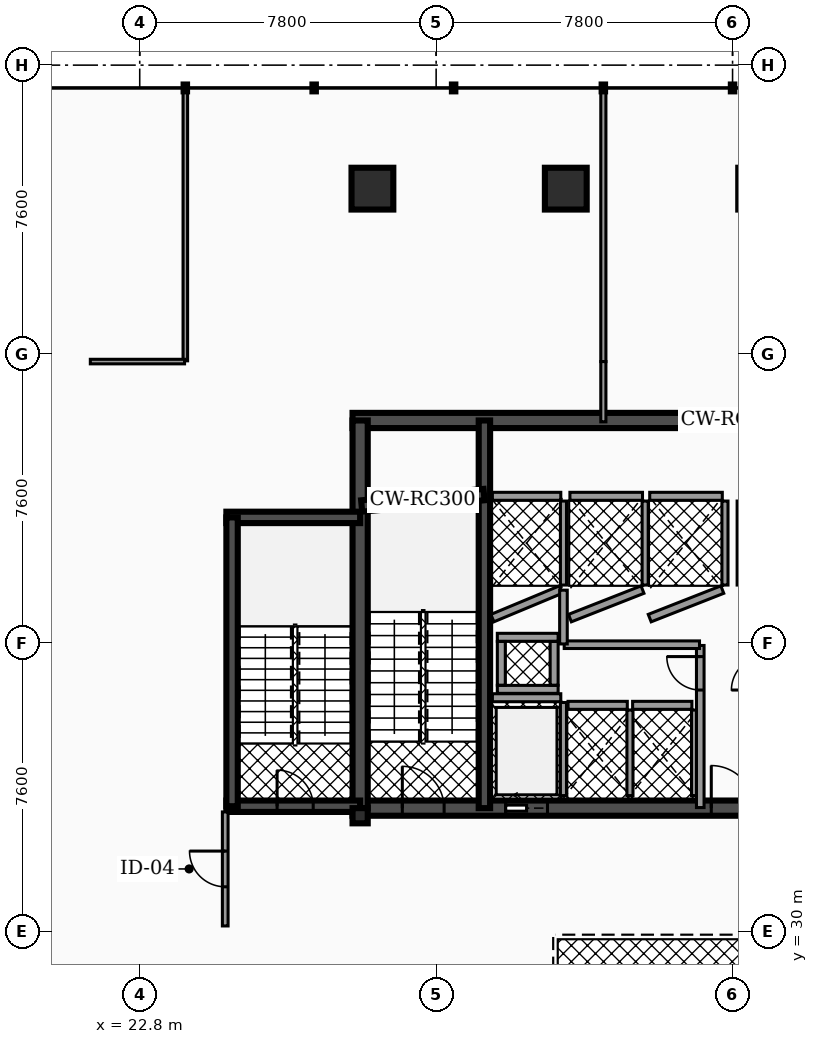
"""IFC4 building model, lengths in metres.
Left out: names, types, materials, properties, quantities, classifications, styles, units other than length and angle.
Written with IfcOpenShell. Run it as: python <this file> out.ifc"""

import sys

from ifc_helpers import new_model, si_unit, direction, frame, frame_2d, origin, origin_2d, place, context, subcontext, project, spatial, rectangle, hollow_rectangle, extrude, element, fill, save


model = new_model("IFC4")
c1 = context("Model", 3, precision=1e-05, world=origin(), true_north=direction((0.0, 1.0)))
c2 = subcontext(c1, "Body", "Model", "MODEL_VIEW")
j1 = project(units=[si_unit("LENGTHUNIT", "METRE"), si_unit("PLANEANGLEUNIT", "RADIAN")], contexts=[c1])
p1 = place(None, origin())
s1 = spatial("IfcSite", under=j1, at=p1, CompositionType="ELEMENT")
p2 = place(p1, origin())
s2 = spatial("IfcBuilding", under=s1, at=p2, CompositionType="ELEMENT")
p3 = place(p2, frame((0.0, 0.0, 5.1)))
s3 = spatial("IfcBuildingStorey", under=s2, at=p3, CompositionType="ELEMENT", Elevation=5.1)
p4 = place(p3, frame((28.4, 43.45, 0.0), z_axis=(0.0, 0.0, 1.0), x_axis=(1.0, 0.0, 0.0)))
e1 = element("IfcWall", 1, at=p4, inside=s3, PredefinedType="SHEAR", context=c2, shape_type="SweptSolid", body=[
    extrude(rectangle(XDim=20.06, YDim=0.4, at=frame_2d((10.03, 0.0))), origin(), (0.0, 0.0, 1.0), 4.14),
])
p5 = place(p3, frame((28.4, 33.25, 0.0), z_axis=(0.0, 0.0, 1.0), x_axis=(1.0, 0.0, 0.0)))
e2 = element("IfcWall", 2, at=p5, inside=s3, PredefinedType="SHEAR", context=c2, shape_type="SweptSolid", body=[
    extrude(rectangle(XDim=20.06, YDim=0.4, at=frame_2d((10.03, 0.0))), origin(), (0.0, 0.0, 1.0), 4.14),
])
p6 = place(p5, frame((4.03, 0.0, 0.0)))
e3 = element("IfcOpeningElement", 3, at=p6, cuts=e2, PredefinedType="OPENING", context=c2, shape_type="SweptSolid", body=[
    extrude(rectangle(XDim=1.1, YDim=2.15, at=frame_2d((0.55, 1.075))), frame((0.0, 0.21, 0.0), z_axis=(0.0, -1.0, 0.0), x_axis=(1.0, 0.0, 0.0)), (0.0, 0.0, 1.0), 0.42),
])
p7 = place(p5, frame((14.87, 0.0, 0.0)))
e4 = element("IfcOpeningElement", 4, at=p7, cuts=e2, PredefinedType="OPENING", context=c2, shape_type="SweptSolid", body=[
    extrude(rectangle(XDim=1.1, YDim=2.15, at=frame_2d((0.55, 1.075))), frame((0.0, 0.21, 0.0), z_axis=(0.0, -1.0, 0.0), x_axis=(1.0, 0.0, 0.0)), (0.0, 0.0, 1.0), 0.42),
])
p8 = place(p5, frame((1.31, 0.0, 0.0)))
e5 = element("IfcOpeningElement", 5, at=p8, cuts=e2, PredefinedType="OPENING", context=c2, shape_type="SweptSolid", body=[
    extrude(rectangle(XDim=1.1, YDim=2.2, at=frame_2d((0.55, 1.1))), frame((0.0, 0.21, 0.0), z_axis=(0.0, -1.0, 0.0), x_axis=(1.0, 0.0, 0.0)), (0.0, 0.0, 1.0), 0.42),
])
p9 = place(p5, frame((9.44, 0.0, 0.0)))
e6 = element("IfcOpeningElement", 6, at=p9, cuts=e2, PredefinedType="OPENING", context=c2, shape_type="SweptSolid", body=[
    extrude(rectangle(XDim=1.12, YDim=2.05, at=frame_2d((0.56, 1.025))), frame((0.0, 0.21, 0.0), z_axis=(0.0, -1.0, 0.0), x_axis=(1.0, 0.0, 0.0)), (0.0, 0.0, 1.0), 0.42),
])
p10 = place(p5, frame((17.65, 0.0, 0.0)))
e7 = element("IfcOpeningElement", 7, at=p10, cuts=e2, PredefinedType="OPENING", context=c2, shape_type="SweptSolid", body=[
    extrude(rectangle(XDim=1.1, YDim=2.2, at=frame_2d((0.55, 1.1))), frame((0.0, 0.21, 0.0), z_axis=(0.0, -1.0, 0.0), x_axis=(1.0, 0.0, 0.0)), (0.0, 0.0, 1.0), 0.42),
])
p11 = place(p3, frame((28.6, 33.25, 0.0), z_axis=(0.0, 0.0, 1.0), x_axis=(0.0, 1.0, 0.0)))
e8 = element("IfcWall", 8, at=p11, inside=s3, PredefinedType="SHEAR", context=c2, shape_type="SweptSolid", body=[
    extrude(rectangle(XDim=10.2, YDim=0.4, at=frame_2d((5.1, 0.0))), origin(), (0.0, 0.0, 1.0), 4.14),
])
p12 = place(p3, frame((31.87, 33.25, 0.0), z_axis=(0.0, 0.0, 1.0), x_axis=(0.0, 1.0, 0.0)))
e9 = element("IfcWall", 9, at=p12, inside=s3, PredefinedType="SHEAR", context=c2, shape_type="SweptSolid", body=[
    extrude(rectangle(XDim=10.2, YDim=0.3, at=frame_2d((5.1, 0.0))), origin(), (0.0, 0.0, 1.0), 4.14),
])
p13 = place(p3, frame((28.64, 41.2, 0.0), z_axis=(0.0, 0.0, 1.0), x_axis=(0.995687118776, 0.092774789157, 0.0)))
e10 = element("IfcWall", 10, at=p13, inside=s3, PredefinedType="SHEAR", context=c2, shape_type="SweptSolid", body=[
    extrude(rectangle(XDim=3.234, YDim=0.3, at=frame_2d((1.617, 0.0))), origin(), (0.0, 0.0, 1.0), 4.14),
])
p14 = place(p3, frame((25.08, 40.9, 0.0), z_axis=(0.0, 0.0, 1.0), x_axis=(1.0, 0.0, 0.0)))
e11 = element("IfcWall", 11, at=p14, inside=s3, PredefinedType="SHEAR", context=c2, shape_type="SweptSolid", body=[
    extrude(rectangle(XDim=3.52, YDim=0.3, at=frame_2d((1.76, 0.0))), origin(), (0.0, 0.0, 1.0), 4.14),
])
p15 = place(p3, frame((25.08, 33.3, 0.0), z_axis=(0.0, 0.0, 1.0), x_axis=(1.0, 0.0, 0.0)))
e12 = element("IfcWall", 12, at=p15, inside=s3, PredefinedType="SHEAR", context=c2, shape_type="SweptSolid", body=[
    extrude(rectangle(XDim=3.52, YDim=0.3, at=frame_2d((1.76, 0.0))), origin(), (0.0, 0.0, 1.0), 4.14),
])
p16 = place(p15, frame((1.335, 0.0, 0.0)))
e13 = element("IfcOpeningElement", 13, at=p16, cuts=e12, PredefinedType="OPENING", context=c2, shape_type="SweptSolid", body=[
    extrude(rectangle(XDim=0.95, YDim=2.2, at=frame_2d((0.475, 1.1))), frame((0.0, 0.16, 0.0), z_axis=(0.0, -1.0, 0.0), x_axis=(1.0, 0.0, 0.0)), (0.0, 0.0, 1.0), 0.32),
])
p17 = place(p3, frame((25.23, 33.3, 0.0), z_axis=(0.0, 0.0, 1.0), x_axis=(0.0, 1.0, 0.0)))
e14 = element("IfcWall", 14, at=p17, inside=s3, PredefinedType="SHEAR", context=c2, shape_type="SweptSolid", body=[
    extrude(rectangle(XDim=7.6, YDim=0.3, at=frame_2d((3.8, 0.0))), origin(), (0.0, 0.0, 1.0), 4.14),
])
for number, where, z_axis, x_axis in (
    (15, (34.011, 49.55, 0.0), (0.0, 0.0, 1.0), (1.0, 0.0, 0.0)),
    (16, (28.923, 49.55, 0.0), (0.0, 0.0, 1.0), (1.0, 0.0, 0.0)),
):
    element("IfcColumn", number, at=place(p3, frame(where, z_axis=z_axis, x_axis=x_axis)), inside=s3, PredefinedType="COLUMN", context=c2, shape_type="SweptSolid", body=[
        extrude(hollow_rectangle(XDim=1.1, YDim=1.1, WallThickness=0.055, at=origin_2d()), origin(), (0.0, 0.0, 1.0), 4.14),
    ])
p18 = place(p3, frame((28.6, 33.05, 0.0), z_axis=(0.0, 0.0, 1.0), x_axis=(1.0, 0.0, 0.0)))
e17 = element("IfcColumn", 17, at=p18, inside=s3, PredefinedType="PILASTER", context=c2, shape_type="SweptSolid", body=[
    extrude(hollow_rectangle(XDim=0.4, YDim=0.4, WallThickness=0.02, at=origin_2d()), origin(), (0.0, 0.0, 1.0), 4.14),
])
p19 = place(p3, frame((32.08, 36.155, 0.0), z_axis=(0.0, 0.0, 1.0), x_axis=(1.0, 0.0, 0.0)))
e18 = element("IfcWall", 18, at=p19, inside=s3, PredefinedType="SOLIDWALL", context=c2, shape_type="SweptSolid", body=[
    extrude(rectangle(XDim=1.8, YDim=0.21, at=frame_2d((0.9, 0.0))), origin(), (0.0, 0.0, 1.0), 3.112),
])
p20 = place(p3, frame((33.95, 33.58, 0.0), z_axis=(0.0, 0.0, 1.0), x_axis=(0.0, 1.0, 0.0)))
e19 = element("IfcWall", 19, at=p20, inside=s3, PredefinedType="SOLIDWALL", context=c2, shape_type="SweptSolid", body=[
    extrude(rectangle(XDim=2.45, YDim=0.16, at=frame_2d((1.225, 0.0))), origin(), (0.0, 0.0, 1.0), 3.112),
])
p21 = place(p3, frame((32.08, 38.25, 0.0), z_axis=(0.0, 0.0, 1.0), x_axis=(0.923062104416, 0.384650947472, 0.0)))
e20 = element("IfcWall", 20, at=p21, inside=s3, PredefinedType="SOLIDWALL", context=c2, shape_type="SweptSolid", body=[
    extrude(rectangle(XDim=1.95, YDim=0.21, at=frame_2d((0.975, 0.0))), origin(), (0.0, 0.0, 1.0), 3.112),
])
p22 = place(p3, frame((32.08, 41.455, 0.0), z_axis=(0.0, 0.0, 1.0), x_axis=(1.0, 0.0, 0.0)))
e21 = element("IfcWall", 21, at=p22, inside=s3, PredefinedType="SOLIDWALL", context=c2, shape_type="SweptSolid", body=[
    extrude(rectangle(XDim=1.8, YDim=0.21, at=frame_2d((0.9, 0.0))), origin(), (0.0, 0.0, 1.0), 3.112),
])
p23 = place(p3, frame((33.95, 39.12, 0.0), z_axis=(0.0, 0.0, 1.0), x_axis=(0.0, 1.0, 0.0)))
e22 = element("IfcWall", 22, at=p23, inside=s3, PredefinedType="SOLIDWALL", context=c2, shape_type="SweptSolid", body=[
    extrude(rectangle(XDim=2.21, YDim=0.16, at=frame_2d((1.105, 0.0))), origin(), (0.0, 0.0, 1.0), 3.112),
])
p24 = place(p3, frame((34.12, 38.25, 0.0), z_axis=(0.0, 0.0, 1.0), x_axis=(0.930804993012, 0.36551616241, 0.0)))
e23 = element("IfcWall", 23, at=p24, inside=s3, PredefinedType="SOLIDWALL", context=c2, shape_type="SweptSolid", body=[
    extrude(rectangle(XDim=2.052, YDim=0.21, at=frame_2d((1.026, 0.0))), origin(), (0.0, 0.0, 1.0), 3.112),
])
p25 = place(p3, frame((34.12, 41.455, 0.0), z_axis=(0.0, 0.0, 1.0), x_axis=(1.0, 0.0, 0.0)))
e24 = element("IfcWall", 24, at=p25, inside=s3, PredefinedType="SOLIDWALL", context=c2, shape_type="SweptSolid", body=[
    extrude(rectangle(XDim=1.91, YDim=0.21, at=frame_2d((0.955, 0.0))), origin(), (0.0, 0.0, 1.0), 3.112),
])
p26 = place(p3, frame((36.1, 39.12, 0.0), z_axis=(0.0, 0.0, 1.0), x_axis=(0.0, 1.0, 0.0)))
e25 = element("IfcWall", 25, at=p26, inside=s3, PredefinedType="SOLIDWALL", context=c2, shape_type="SweptSolid", body=[
    extrude(rectangle(XDim=2.21, YDim=0.16, at=frame_2d((1.105, 0.0))), origin(), (0.0, 0.0, 1.0), 3.112),
])
p27 = place(p3, frame((36.22, 38.25, 0.0), z_axis=(0.0, 0.0, 1.0), x_axis=(0.930804993012, 0.36551616241, 0.0)))
e26 = element("IfcWall", 26, at=p27, inside=s3, PredefinedType="SOLIDWALL", context=c2, shape_type="SweptSolid", body=[
    extrude(rectangle(XDim=2.052, YDim=0.21, at=frame_2d((1.026, 0.0))), origin(), (0.0, 0.0, 1.0), 3.112),
])
p28 = place(p3, frame((36.22, 41.455, 0.0), z_axis=(0.0, 0.0, 1.0), x_axis=(1.0, 0.0, 0.0)))
e27 = element("IfcWall", 27, at=p28, inside=s3, PredefinedType="SOLIDWALL", context=c2, shape_type="SweptSolid", body=[
    extrude(rectangle(XDim=1.91, YDim=0.21, at=frame_2d((0.955, 0.0))), origin(), (0.0, 0.0, 1.0), 3.112),
])
for number, where, z_axis, x_axis in (
    (28, (38.2, 39.12, 0.0), (0.0, 0.0, 1.0), (0.0, 1.0, 0.0)),
    (29, (38.6, 39.12, 0.0), (0.0, 0.0, 1.0), (0.0, 1.0, 0.0)),
):
    element("IfcWall", number, at=place(p3, frame(where, z_axis=z_axis, x_axis=x_axis)), inside=s3, PredefinedType="SOLIDWALL", context=c2, shape_type="SweptSolid", body=[
        extrude(rectangle(XDim=2.21, YDim=0.16, at=frame_2d((1.105, 0.0))), origin(), (0.0, 0.0, 1.0), 3.112),
    ])
p29 = place(p3, frame((34.07, 35.955, 0.0), z_axis=(0.0, 0.0, 1.0), x_axis=(1.0, 0.0, 0.0)))
e30 = element("IfcWall", 30, at=p29, inside=s3, PredefinedType="SOLIDWALL", context=c2, shape_type="SweptSolid", body=[
    extrude(rectangle(XDim=1.56, YDim=0.21, at=frame_2d((0.78, 0.0))), origin(), (0.0, 0.0, 1.0), 3.112),
])
p30 = place(p3, frame((35.7, 33.58, 0.0), z_axis=(0.0, 0.0, 1.0), x_axis=(0.0, 1.0, 0.0)))
e31 = element("IfcWall", 31, at=p30, inside=s3, PredefinedType="SOLIDWALL", context=c2, shape_type="SweptSolid", body=[
    extrude(rectangle(XDim=2.25, YDim=0.16, at=frame_2d((1.125, 0.0))), origin(), (0.0, 0.0, 1.0), 3.112),
])
p31 = place(p3, frame((35.77, 35.955, 0.0), z_axis=(0.0, 0.0, 1.0), x_axis=(1.0, 0.0, 0.0)))
e32 = element("IfcWall", 32, at=p31, inside=s3, PredefinedType="SOLIDWALL", context=c2, shape_type="SweptSolid", body=[
    extrude(rectangle(XDim=1.56, YDim=0.21, at=frame_2d((0.78, 0.0))), origin(), (0.0, 0.0, 1.0), 3.112),
])
p32 = place(p3, frame((37.4, 33.58, 0.0), z_axis=(0.0, 0.0, 1.0), x_axis=(0.0, 1.0, 0.0)))
e33 = element("IfcWall", 33, at=p32, inside=s3, PredefinedType="SOLIDWALL", context=c2, shape_type="SweptSolid", body=[
    extrude(rectangle(XDim=2.25, YDim=0.16, at=frame_2d((1.125, 0.0))), origin(), (0.0, 0.0, 1.0), 3.112),
])
for number, where, z_axis, x_axis in (
    (34, (32.21, 36.375, 0.0), (0.0, 0.0, 1.0), (1.0, 0.0, 0.0)),
    (35, (32.21, 37.745, 0.0), (0.0, 0.0, 1.0), (1.0, 0.0, 0.0)),
):
    element("IfcWall", number, at=place(p3, frame(where, z_axis=z_axis, x_axis=x_axis)), inside=s3, PredefinedType="SOLIDWALL", context=c2, shape_type="SweptSolid", body=[
        extrude(rectangle(XDim=1.6, YDim=0.21, at=frame_2d((0.8, 0.0))), origin(), (0.0, 0.0, 1.0), 4.14),
    ])
for number, where, z_axis, x_axis in (
    (36, (32.315, 36.485, 0.0), (0.0, 0.0, 1.0), (0.0, 1.0, 0.0)),
    (37, (33.705, 36.485, 0.0), (0.0, 0.0, 1.0), (0.0, 1.0, 0.0)),
):
    element("IfcWall", number, at=place(p3, frame(where, z_axis=z_axis, x_axis=x_axis)), inside=s3, PredefinedType="SOLIDWALL", context=c2, shape_type="SweptSolid", body=[
        extrude(rectangle(XDim=1.15, YDim=0.21, at=frame_2d((0.575, 0.0))), origin(), (0.0, 0.0, 1.0), 4.14),
    ])
p33 = place(p3, frame((37.55, 33.265, 0.0), z_axis=(0.0, 0.0, 1.0), x_axis=(0.0, 1.0, 0.0)))
e38 = element("IfcWall", 38, at=p33, inside=s3, PredefinedType="PARTITIONING", context=c2, shape_type="SweptSolid", body=[
    extrude(rectangle(XDim=4.265, YDim=0.2, at=frame_2d((2.133, 0.0))), origin(), (0.0, 0.0, 1.0), 3.097),
])
p34 = place(p33, frame((3.093, 0.0, 0.0)))
e39 = element("IfcOpeningElement", 39, at=p34, cuts=e38, PredefinedType="OPENING", context=c2, shape_type="SweptSolid", body=[
    extrude(rectangle(XDim=0.88, YDim=2.05, at=frame_2d((0.44, 1.025))), frame((0.0, 0.11, 0.0), z_axis=(0.0, -1.0, 0.0), x_axis=(1.0, 0.0, 0.0)), (0.0, 0.0, 1.0), 0.22),
])
p35 = place(p3, frame((33.97, 37.55, 0.0), z_axis=(0.0, 0.0, 1.0), x_axis=(1.0, 0.0, 0.0)))
e40 = element("IfcWall", 40, at=p35, inside=s3, PredefinedType="PARTITIONING", context=c2, shape_type="SweptSolid", body=[
    extrude(rectangle(XDim=3.56, YDim=0.2, at=frame_2d((1.78, 0.0))), origin(), (0.0, 0.0, 1.0), 3.097),
])
p36 = place(p3, frame((33.95, 37.57, 0.0), z_axis=(0.0, 0.0, 1.0), x_axis=(0.0, 1.0, 0.0)))
e41 = element("IfcWall", 41, at=p36, inside=s3, PredefinedType="PARTITIONING", context=c2, shape_type="SweptSolid", body=[
    extrude(rectangle(XDim=1.415, YDim=0.2, at=frame_2d((0.708, 0.0))), origin(), (0.0, 0.0, 1.0), 3.097),
])
p37 = place(p3, frame((25.05, 30.15, 0.0), z_axis=(0.0, 0.0, 1.0), x_axis=(0.0, 1.0, 0.0)))
e42 = element("IfcWall", 42, at=p37, inside=s3, PredefinedType="PARTITIONING", context=c2, shape_type="SweptSolid", body=[
    extrude(rectangle(XDim=3.0, YDim=0.15, at=frame_2d((1.5, 0.0))), origin(), (0.0, 0.0, 1.0), 3.097),
])
p38 = place(p37, frame((1.03, 0.0, 0.0)))
e43 = element("IfcOpeningElement", 43, at=p38, cuts=e42, PredefinedType="OPENING", context=c2, shape_type="SweptSolid", body=[
    extrude(rectangle(XDim=0.94, YDim=2.05, at=frame_2d((0.47, 1.025))), frame((0.0, 0.085, 0.0), z_axis=(0.0, -1.0, 0.0), x_axis=(1.0, 0.0, 0.0)), (0.0, 0.0, 1.0), 0.17),
])
p39 = place(p3, frame((24.0, 45.02, 0.0), z_axis=(0.0, 0.0, 1.0), x_axis=(0.0, 1.0, 0.0)))
e44 = element("IfcWall", 44, at=p39, inside=s3, PredefinedType="PARTITIONING", context=c2, shape_type="SweptSolid", body=[
    extrude(rectangle(XDim=7.165, YDim=0.12, at=frame_2d((3.583, 0.0))), origin(), (0.0, 0.0, 1.0), 3.097),
])
p40 = place(p3, frame((21.5, 45.0, 0.0), z_axis=(0.0, 0.0, 1.0), x_axis=(1.0, 0.0, 0.0)))
e45 = element("IfcWall", 45, at=p40, inside=s3, PredefinedType="PARTITIONING", context=c2, shape_type="SweptSolid", body=[
    extrude(rectangle(XDim=2.48, YDim=0.12, at=frame_2d((1.24, 0.0))), origin(), (0.0, 0.0, 1.0), 3.097),
])
p41 = place(p3, frame((35.0, 45.0, 0.0), z_axis=(0.0, 0.0, 1.0), x_axis=(0.0, 1.0, 0.0)))
e46 = element("IfcWall", 46, at=p41, inside=s3, PredefinedType="PARTITIONING", context=c2, shape_type="SweptSolid", body=[
    extrude(rectangle(XDim=7.185, YDim=0.135, at=frame_2d((3.593, 0.0))), origin(), (0.0, 0.0, 1.0), 3.097),
])
p42 = place(p3, frame((35.0, 43.415, 0.0), z_axis=(0.0, 0.0, 1.0), x_axis=(0.0, 1.0, 0.0)))
e47 = element("IfcWall", 47, at=p42, inside=s3, PredefinedType="PARTITIONING", context=c2, shape_type="SweptSolid", body=[
    extrude(rectangle(XDim=1.585, YDim=0.135, at=frame_2d((0.792, 0.0))), origin(), (0.0, 0.0, 1.0), 3.097),
])
p43 = place(p6, origin())
e48 = element("IfcDoor", 48, at=p43, inside=s3, OperationType="SLIDING_TO_LEFT", PredefinedType="DOOR", context=c2, shape_type="SweptSolid", body=[
    extrude(rectangle(XDim=1.1, YDim=2.15, at=frame_2d((0.55, 1.075))), frame((0.0, 0.025, 0.0), z_axis=(0.0, -1.0, 0.0), x_axis=(1.0, 0.0, 0.0)), (0.0, 0.0, 1.0), 0.05),
])
fill(e3, e48)
p44 = place(p8, origin())
e49 = element("IfcDoor", 49, at=p44, inside=s3, OperationType="SINGLE_SWING_LEFT", PredefinedType="DOOR", context=c2, shape_type="SweptSolid", body=[
    extrude(rectangle(XDim=1.1, YDim=2.2, at=frame_2d((0.55, 1.1))), frame((0.0, 0.025, 0.0), z_axis=(0.0, -1.0, 0.0), x_axis=(1.0, 0.0, 0.0)), (0.0, 0.0, 1.0), 0.05),
])
fill(e5, e49)
p45 = place(p9, origin())
e50 = element("IfcDoor", 50, at=p45, inside=s3, OperationType="SINGLE_SWING_LEFT", PredefinedType="DOOR", context=c2, shape_type="SweptSolid", body=[
    extrude(rectangle(XDim=1.12, YDim=2.05, at=frame_2d((0.56, 1.025))), frame((0.0, 0.025, 0.0), z_axis=(0.0, -1.0, 0.0), x_axis=(1.0, 0.0, 0.0)), (0.0, 0.0, 1.0), 0.05),
])
fill(e6, e50)
p46 = place(p16, origin())
e51 = element("IfcDoor", 51, at=p46, inside=s3, OperationType="SINGLE_SWING_LEFT", PredefinedType="DOOR", context=c2, shape_type="SweptSolid", body=[
    extrude(rectangle(XDim=0.95, YDim=2.2, at=frame_2d((0.475, 1.1))), frame((0.0, 0.025, 0.0), z_axis=(0.0, -1.0, 0.0), x_axis=(1.0, 0.0, 0.0)), (0.0, 0.0, 1.0), 0.05),
])
fill(e13, e51)
p47 = place(p34, origin())
e52 = element("IfcDoor", 52, at=p47, inside=s3, OperationType="SINGLE_SWING_RIGHT", PredefinedType="DOOR", context=c2, shape_type="SweptSolid", body=[
    extrude(rectangle(XDim=0.88, YDim=2.05, at=frame_2d((0.44, 1.025))), frame((0.0, 0.025, 0.0), z_axis=(0.0, -1.0, 0.0), x_axis=(1.0, 0.0, 0.0)), (0.0, 0.0, 1.0), 0.05),
])
fill(e39, e52)
p48 = place(p38, origin())
e53 = element("IfcDoor", 53, at=p48, inside=s3, OperationType="SINGLE_SWING_RIGHT", PredefinedType="DOOR", context=c2, shape_type="SweptSolid", body=[
    extrude(rectangle(XDim=0.94, YDim=2.05, at=frame_2d((0.47, 1.025))), frame((0.0, 0.025, 0.0), z_axis=(0.0, -1.0, 0.0), x_axis=(1.0, 0.0, 0.0)), (0.0, 0.0, 1.0), 0.05),
])
fill(e43, e53)
save(model, sys.argv[1])
